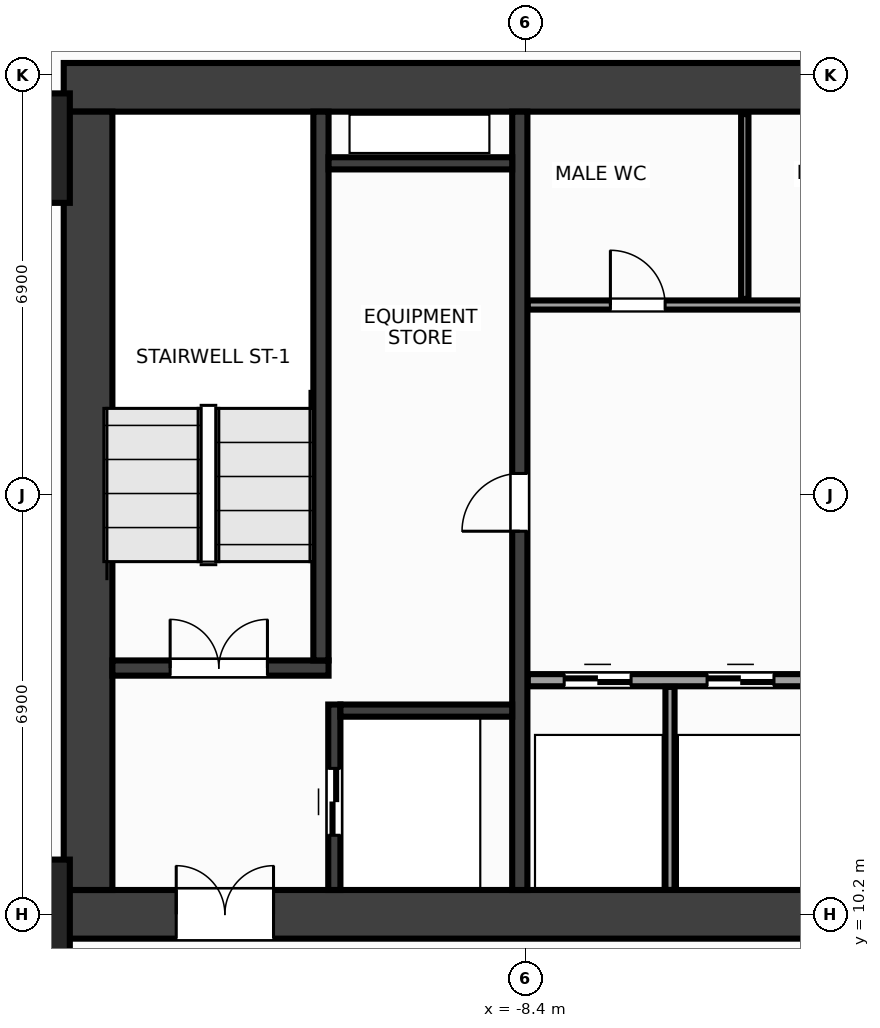
"""IFC4 building model, lengths in metres.
Left out: names, types, materials, properties, quantities, classifications, styles, units other than length and angle.
Written with IfcOpenShell. Run it as: python <this file> out.ifc"""

import sys

from ifc_helpers import new_model, si_unit, direction, frame, frame_2d, origin, origin_2d, place, context, subcontext, project, spatial, rectangle, extrude, source, transform, mapped, element, fill, save


model = new_model("IFC4")
c1 = context("Model", 3, precision=1e-05, world=origin(), true_north=direction((0.0, 1.0)))
c2 = subcontext(c1, "Body", "Model", "MODEL_VIEW")
j1 = project(units=[si_unit("LENGTHUNIT", "METRE"), si_unit("PLANEANGLEUNIT", "RADIAN")], contexts=[c1])
p1 = place(None, origin())
s1 = spatial("IfcSite", under=j1, at=p1, CompositionType="ELEMENT")
p2 = place(p1, origin())
s2 = spatial("IfcBuilding", under=s1, at=p2, CompositionType="ELEMENT")
p3 = place(p2, frame((0.0, 0.0, 30.8)))
s3 = spatial("IfcBuildingStorey", under=s2, at=p3, CompositionType="ELEMENT", Elevation=30.8)
m1 = source(origin(), c2, "Body", "SweptSolid", [
    extrude(rectangle(XDim=32.0, YDim=0.8, at=frame_2d((16.0, 0.0))), origin(), (0.0, 0.0, 1.0), 3.6),
])
p4 = place(p3, frame((-16.0, 23.8, 0.0), z_axis=(0.0, 0.0, 1.0), x_axis=(1.0, 0.0, 0.0)))
e1 = element("IfcWall", 1, at=p4, inside=s3, PredefinedType="SHEAR", context=c2, shape_type="MappedRepresentation", body=[
    mapped(m1, transform((0.0, 0.0, 0.0), x_axis=(1.0, 0.0, 0.0), y_axis=(0.0, 1.0, 0.0), z_axis=(0.0, 0.0, 1.0), scale=1.0)),
])
p5 = place(p3, frame((-16.0, 10.2, 0.0), z_axis=(0.0, 0.0, 1.0), x_axis=(1.0, 0.0, 0.0)))
e2 = element("IfcWall", 2, at=p5, inside=s3, PredefinedType="SHEAR", context=c2, shape_type="MappedRepresentation", body=[
    mapped(m1, transform((0.0, 0.0, 0.0), x_axis=(1.0, 0.0, 0.0), y_axis=(0.0, 1.0, 0.0), z_axis=(0.0, 0.0, 1.0), scale=1.0)),
])
p6 = place(p5, frame((1.85, 0.0, 0.0)))
e3 = element("IfcOpeningElement", 3, at=p6, cuts=e2, PredefinedType="OPENING", context=c2, shape_type="SweptSolid", body=[
    extrude(rectangle(XDim=1.6, YDim=2.15, at=frame_2d((0.8, 1.075))), frame((0.0, 0.412, 0.0), z_axis=(0.0, -1.0, 0.0), x_axis=(1.0, 0.0, 0.0)), (0.0, 0.0, 1.0), 0.824),
])
p7 = place(p5, frame((28.55, 0.0, 0.0)))
e4 = element("IfcOpeningElement", 4, at=p7, cuts=e2, PredefinedType="OPENING", context=c2, shape_type="SweptSolid", body=[
    extrude(rectangle(XDim=1.6, YDim=2.15, at=frame_2d((0.8, 1.075))), frame((0.0, 0.412, 0.0), z_axis=(0.0, -1.0, 0.0), x_axis=(1.0, 0.0, 0.0)), (0.0, 0.0, 1.0), 0.824),
])
p8 = place(p5, frame((15.25, 0.0, 0.0)))
e5 = element("IfcOpeningElement", 5, at=p8, cuts=e2, PredefinedType="OPENING", context=c2, shape_type="SweptSolid", body=[
    extrude(rectangle(XDim=1.5, YDim=2.2, at=frame_2d((0.75, 1.1))), frame((0.0, 0.412, 0.0), z_axis=(0.0, -1.0, 0.0), x_axis=(1.0, 0.0, 0.0)), (0.0, 0.0, 1.0), 0.824),
])
m2 = source(origin(), c2, "Body", "SweptSolid", [
    extrude(rectangle(XDim=12.8, YDim=0.8, at=frame_2d((6.4, 0.0))), origin(), (0.0, 0.0, 1.0), 3.6),
])
p9 = place(p3, frame((-15.6, 10.6, 0.0), z_axis=(0.0, 0.0, 1.0), x_axis=(0.0, 1.0, 0.0)))
e6 = element("IfcWall", 6, at=p9, inside=s3, PredefinedType="SHEAR", context=c2, shape_type="MappedRepresentation", body=[
    mapped(m2, transform((0.0, 0.0, 0.0), x_axis=(1.0, 0.0, 0.0), y_axis=(0.0, 1.0, 0.0), z_axis=(0.0, 0.0, 1.0), scale=1.0)),
])
m3 = source(origin(), c2, "Body", "SweptSolid", [
    extrude(rectangle(XDim=12.8, YDim=0.25, at=frame_2d((6.4, 0.0))), origin(), (0.0, 0.0, 1.0), 3.6),
])
p10 = place(p3, frame((-8.5, 10.6, 0.0), z_axis=(0.0, 0.0, 1.0), x_axis=(0.0, 1.0, 0.0)))
e7 = element("IfcWall", 7, at=p10, inside=s3, PredefinedType="SHEAR", context=c2, shape_type="MappedRepresentation", body=[
    mapped(m3, transform((0.0, 0.0, 0.0), x_axis=(1.0, 0.0, 0.0), y_axis=(0.0, 1.0, 0.0), z_axis=(0.0, 0.0, 1.0), scale=1.0)),
])
p11 = place(p10, frame((5.9, 0.0, 0.0)))
e8 = element("IfcOpeningElement", 8, at=p11, cuts=e7, PredefinedType="OPENING", context=c2, shape_type="SweptSolid", body=[
    extrude(rectangle(XDim=0.95, YDim=2.15, at=frame_2d((0.475, 1.075))), frame((0.0, 0.137, 0.0), z_axis=(0.0, -1.0, 0.0), x_axis=(1.0, 0.0, 0.0)), (0.0, 0.0, 1.0), 0.274),
])
m4 = source(origin(), c2, "Body", "SweptSolid", [
    extrude(rectangle(XDim=3.555, YDim=0.25, at=frame_2d((1.777, 0.0))), origin(), (0.0, 0.0, 1.0), 3.6),
])
p12 = place(p3, frame((-15.2, 14.25, 0.0), z_axis=(0.0, 0.0, 1.0), x_axis=(1.0, 0.0, 0.0)))
e9 = element("IfcWall", 9, at=p12, inside=s3, PredefinedType="SHEAR", context=c2, shape_type="MappedRepresentation", body=[
    mapped(m4, transform((0.0, 0.0, 0.0), x_axis=(1.0, 0.0, 0.0), y_axis=(0.0, 1.0, 0.0), z_axis=(0.0, 0.0, 1.0), scale=1.0)),
])
p13 = place(p12, frame((0.95, 0.0, 0.0)))
e10 = element("IfcOpeningElement", 10, at=p13, cuts=e9, PredefinedType="OPENING", context=c2, shape_type="SweptSolid", body=[
    extrude(rectangle(XDim=1.6, YDim=2.15, at=frame_2d((0.8, 1.075))), frame((0.0, 0.137, 0.0), z_axis=(0.0, -1.0, 0.0), x_axis=(1.0, 0.0, 0.0)), (0.0, 0.0, 1.0), 0.274),
])
m5 = source(origin(), c2, "Body", "SweptSolid", [
    extrude(rectangle(XDim=9.025, YDim=0.25, at=frame_2d((4.512, 0.0))), origin(), (0.0, 0.0, 1.0), 3.6),
])
p14 = place(p3, frame((-11.77, 14.375, 0.0), z_axis=(0.0, 0.0, 1.0), x_axis=(0.0, 1.0, 0.0)))
e11 = element("IfcWall", 11, at=p14, inside=s3, PredefinedType="SHEAR", context=c2, shape_type="MappedRepresentation", body=[
    mapped(m5, transform((0.0, 0.0, 0.0), x_axis=(1.0, 0.0, 0.0), y_axis=(0.0, 1.0, 0.0), z_axis=(0.0, 0.0, 1.0), scale=1.0)),
])
m6 = source(origin(), c2, "Body", "SweptSolid", [
    extrude(rectangle(XDim=3.05, YDim=0.2, at=frame_2d((1.525, 0.0))), origin(), (0.0, 0.0, 1.0), 3.6),
])
p15 = place(p3, frame((-11.55, 10.6, 0.0), z_axis=(0.0, 0.0, 1.0), x_axis=(0.0, 1.0, 0.0)))
e12 = element("IfcWall", 12, at=p15, inside=s3, PredefinedType="SHEAR", context=c2, shape_type="MappedRepresentation", body=[
    mapped(m6, transform((0.0, 0.0, 0.0), x_axis=(1.0, 0.0, 0.0), y_axis=(0.0, 1.0, 0.0), z_axis=(0.0, 0.0, 1.0), scale=1.0)),
])
p16 = place(p15, frame((0.9, 0.0, 0.0)))
e13 = element("IfcOpeningElement", 13, at=p16, cuts=e12, PredefinedType="OPENING", context=c2, shape_type="SweptSolid", body=[
    extrude(rectangle(XDim=1.1, YDim=2.15, at=frame_2d((0.55, 1.075))), frame((0.0, 0.112, 0.0), z_axis=(0.0, -1.0, 0.0), x_axis=(1.0, 0.0, 0.0)), (0.0, 0.0, 1.0), 0.224),
])
m7 = source(origin(), c2, "Body", "SweptSolid", [
    extrude(rectangle(XDim=2.825, YDim=0.2, at=frame_2d((1.413, 0.0))), origin(), (0.0, 0.0, 1.0), 3.6),
])
p17 = place(p3, frame((-11.45, 13.55, 0.0), z_axis=(0.0, 0.0, 1.0), x_axis=(1.0, 0.0, 0.0)))
e14 = element("IfcWall", 14, at=p17, inside=s3, PredefinedType="SHEAR", context=c2, shape_type="MappedRepresentation", body=[
    mapped(m7, transform((0.0, 0.0, 0.0), x_axis=(1.0, 0.0, 0.0), y_axis=(0.0, 1.0, 0.0), z_axis=(0.0, 0.0, 1.0), scale=1.0)),
])
m8 = source(origin(), c2, "Body", "SweptSolid", [
    extrude(rectangle(XDim=3.02, YDim=0.2, at=frame_2d((1.51, 0.0))), origin(), (0.0, 0.0, 1.0), 3.6),
])
p18 = place(p3, frame((-11.645, 22.55, 0.0), z_axis=(0.0, 0.0, 1.0), x_axis=(1.0, 0.0, 0.0)))
e15 = element("IfcWall", 15, at=p18, inside=s3, PredefinedType="SHEAR", context=c2, shape_type="MappedRepresentation", body=[
    mapped(m8, transform((0.0, 0.0, 0.0), x_axis=(1.0, 0.0, 0.0), y_axis=(0.0, 1.0, 0.0), z_axis=(0.0, 0.0, 1.0), scale=1.0)),
])
m9 = source(origin(), c2, "Body", "SweptSolid", [
    extrude(rectangle(XDim=1.8, YDim=1.8, at=origin_2d()), origin(), (0.0, 0.0, 1.0), 3.6),
])
for number, where, z_axis, x_axis in (
    (16, (-16.8, 10.2, 0.0), (0.0, 0.0, 1.0), (1.0, 0.0, 0.0)),
    (17, (-16.8, 22.8, 0.0), (0.0, 0.0, 1.0), (1.0, 0.0, 0.0)),
):
    element("IfcColumn", number, at=place(p3, frame(where, z_axis=z_axis, x_axis=x_axis)), inside=s3, PredefinedType="COLUMN", context=c2, shape_type="MappedRepresentation", body=[
        mapped(m9, transform((0.0, 0.0, 0.0), x_axis=(1.0, 0.0, 0.0), y_axis=(0.0, 1.0, 0.0), z_axis=(0.0, 0.0, 1.0), scale=1.0)),
    ])
m10 = source(origin(), c2, "Body", "SweptSolid", [
    extrude(rectangle(XDim=7.07, YDim=0.2, at=frame_2d((3.535, 0.0))), origin(), (0.0, 0.0, 1.0), 3.36),
])
p19 = place(p3, frame((-8.37, 14.05, 0.0), z_axis=(0.0, 0.0, 1.0), x_axis=(1.0, 0.0, 0.0)))
e18 = element("IfcWall", 18, at=p19, inside=s3, PredefinedType="PARTITIONING", context=c2, shape_type="MappedRepresentation", body=[
    mapped(m10, transform((0.0, 0.0, 0.0), x_axis=(1.0, 0.0, 0.0), y_axis=(0.0, 1.0, 0.0), z_axis=(0.0, 0.0, 1.0), scale=1.0)),
])
p20 = place(p19, frame((0.6, 0.0, 0.0)))
e19 = element("IfcOpeningElement", 19, at=p20, cuts=e18, PredefinedType="OPENING", context=c2, shape_type="SweptSolid", body=[
    extrude(rectangle(XDim=1.1, YDim=2.15, at=frame_2d((0.55, 1.075))), frame((0.0, 0.112, 0.0), z_axis=(0.0, -1.0, 0.0), x_axis=(1.0, 0.0, 0.0)), (0.0, 0.0, 1.0), 0.224),
])
p21 = place(p19, frame((2.95, 0.0, 0.0)))
e20 = element("IfcOpeningElement", 20, at=p21, cuts=e18, PredefinedType="OPENING", context=c2, shape_type="SweptSolid", body=[
    extrude(rectangle(XDim=1.1, YDim=2.15, at=frame_2d((0.55, 1.075))), frame((0.0, 0.112, 0.0), z_axis=(0.0, -1.0, 0.0), x_axis=(1.0, 0.0, 0.0)), (0.0, 0.0, 1.0), 0.224),
])
p22 = place(p19, frame((5.3, 0.0, 0.0)))
e21 = element("IfcOpeningElement", 21, at=p22, cuts=e18, PredefinedType="OPENING", context=c2, shape_type="SweptSolid", body=[
    extrude(rectangle(XDim=1.1, YDim=2.15, at=frame_2d((0.55, 1.075))), frame((0.0, 0.112, 0.0), z_axis=(0.0, -1.0, 0.0), x_axis=(1.0, 0.0, 0.0)), (0.0, 0.0, 1.0), 0.224),
])
m11 = source(origin(), c2, "Body", "SweptSolid", [
    extrude(rectangle(XDim=14.59, YDim=0.15, at=frame_2d((7.295, 0.0))), origin(), (0.0, 0.0, 1.0), 3.36),
])
p23 = place(p3, frame((-8.37, 20.22, 0.0), z_axis=(0.0, 0.0, 1.0), x_axis=(1.0, 0.0, 0.0)))
e22 = element("IfcWall", 22, at=p23, inside=s3, PredefinedType="PARTITIONING", context=c2, shape_type="MappedRepresentation", body=[
    mapped(m11, transform((0.0, 0.0, 0.0), x_axis=(1.0, 0.0, 0.0), y_axis=(0.0, 1.0, 0.0), z_axis=(0.0, 0.0, 1.0), scale=1.0)),
])
p24 = place(p23, frame((1.36, 0.0, 0.0)))
e23 = element("IfcOpeningElement", 23, at=p24, cuts=e22, PredefinedType="OPENING", context=c2, shape_type="SweptSolid", body=[
    extrude(rectangle(XDim=0.9, YDim=2.15, at=frame_2d((0.45, 1.075))), frame((0.0, 0.087, 0.0), z_axis=(0.0, -1.0, 0.0), x_axis=(1.0, 0.0, 0.0)), (0.0, 0.0, 1.0), 0.174),
])
p25 = place(p23, frame((4.92, 0.0, 0.0)))
e24 = element("IfcOpeningElement", 24, at=p25, cuts=e22, PredefinedType="OPENING", context=c2, shape_type="SweptSolid", body=[
    extrude(rectangle(XDim=0.9, YDim=2.15, at=frame_2d((0.45, 1.075))), frame((0.0, 0.087, 0.0), z_axis=(0.0, -1.0, 0.0), x_axis=(1.0, 0.0, 0.0)), (0.0, 0.0, 1.0), 0.174),
])
p26 = place(p23, frame((10.37, 0.0, 0.0)))
e25 = element("IfcOpeningElement", 25, at=p26, cuts=e22, PredefinedType="OPENING", context=c2, shape_type="SweptSolid", body=[
    extrude(rectangle(XDim=0.9, YDim=2.15, at=frame_2d((0.45, 1.075))), frame((0.0, 0.087, 0.0), z_axis=(0.0, -1.0, 0.0), x_axis=(1.0, 0.0, 0.0)), (0.0, 0.0, 1.0), 0.174),
])
m12 = source(origin(), c2, "Body", "SweptSolid", [
    extrude(rectangle(XDim=3.34, YDim=0.15, at=frame_2d((1.67, 0.0))), origin(), (0.0, 0.0, 1.0), 3.36),
])
p27 = place(p3, frame((-6.03, 10.6, 0.0), z_axis=(0.0, 0.0, 1.0), x_axis=(0.0, 1.0, 0.0)))
e26 = element("IfcWall", 26, at=p27, inside=s3, PredefinedType="PARTITIONING", context=c2, shape_type="MappedRepresentation", body=[
    mapped(m12, transform((0.0, 0.0, 0.0), x_axis=(1.0, 0.0, 0.0), y_axis=(0.0, 1.0, 0.0), z_axis=(0.0, 0.0, 1.0), scale=1.0)),
])
m13 = source(origin(), c2, "Body", "SweptSolid", [
    extrude(rectangle(XDim=3.04, YDim=0.12, at=frame_2d((1.52, 0.0))), origin(), (0.0, 0.0, 1.0), 3.36),
])
p28 = place(p3, frame((-4.8, 20.32, 0.0), z_axis=(0.0, 0.0, 1.0), x_axis=(0.0, 1.0, 0.0)))
e27 = element("IfcWall", 27, at=p28, inside=s3, PredefinedType="PARTITIONING", context=c2, shape_type="MappedRepresentation", body=[
    mapped(m13, transform((0.0, 0.0, 0.0), x_axis=(1.0, 0.0, 0.0), y_axis=(0.0, 1.0, 0.0), z_axis=(0.0, 0.0, 1.0), scale=1.0)),
])
m14 = source(origin(), c2, "Body", "SweptSolid", [
    extrude(rectangle(XDim=1.6, YDim=2.15, at=frame_2d((0.8, 1.075))), frame((0.0, 0.025, 0.0), z_axis=(0.0, -1.0, 0.0), x_axis=(1.0, 0.0, 0.0)), (0.0, 0.0, 1.0), 0.05),
])
p29 = place(p13, origin())
e28 = element("IfcDoor", 28, at=p29, inside=s3, OperationType="DOUBLE_DOOR_SINGLE_SWING", PredefinedType="DOOR", context=c2, shape_type="MappedRepresentation", body=[
    mapped(m14, transform((0.0, 0.0, 0.0), x_axis=(1.0, 0.0, 0.0), y_axis=(0.0, 1.0, 0.0), z_axis=(0.0, 0.0, 1.0), scale=1.0)),
])
fill(e10, e28)
p30 = place(p6, origin())
e29 = element("IfcDoor", 29, at=p30, inside=s3, OperationType="DOUBLE_DOOR_SINGLE_SWING", PredefinedType="DOOR", context=c2, shape_type="MappedRepresentation", body=[
    mapped(m14, transform((0.0, 0.0, 0.0), x_axis=(1.0, 0.0, 0.0), y_axis=(0.0, 1.0, 0.0), z_axis=(0.0, 0.0, 1.0), scale=1.0)),
])
fill(e3, e29)
m15 = source(origin(), c2, "Body", "SweptSolid", [
    extrude(rectangle(XDim=1.1, YDim=2.15, at=frame_2d((0.55, 1.075))), frame((0.0, 0.025, 0.0), z_axis=(0.0, -1.0, 0.0), x_axis=(1.0, 0.0, 0.0)), (0.0, 0.0, 1.0), 0.05),
])
p31 = place(p16, origin())
e30 = element("IfcDoor", 30, at=p31, inside=s3, OperationType="DOUBLE_DOOR_SLIDING", PredefinedType="DOOR", context=c2, shape_type="MappedRepresentation", body=[
    mapped(m15, transform((0.0, 0.0, 0.0), x_axis=(1.0, 0.0, 0.0), y_axis=(0.0, 1.0, 0.0), z_axis=(0.0, 0.0, 1.0), scale=1.0)),
])
fill(e13, e30)
m16 = source(origin(), c2, "Body", "SweptSolid", [
    extrude(rectangle(XDim=0.95, YDim=2.15, at=frame_2d((0.475, 1.075))), frame((0.0, 0.025, 0.0), z_axis=(0.0, -1.0, 0.0), x_axis=(1.0, 0.0, 0.0)), (0.0, 0.0, 1.0), 0.05),
])
p32 = place(p11, origin())
e31 = element("IfcDoor", 31, at=p32, inside=s3, OperationType="SINGLE_SWING_LEFT", PredefinedType="DOOR", context=c2, shape_type="MappedRepresentation", body=[
    mapped(m16, transform((0.0, 0.0, 0.0), x_axis=(1.0, 0.0, 0.0), y_axis=(0.0, 1.0, 0.0), z_axis=(0.0, 0.0, 1.0), scale=1.0)),
])
fill(e8, e31)
p33 = place(p20, origin())
e32 = element("IfcDoor", 32, at=p33, inside=s3, OperationType="DOUBLE_DOOR_SLIDING", PredefinedType="DOOR", context=c2, shape_type="MappedRepresentation", body=[
    mapped(m15, transform((0.0, 0.0, 0.0), x_axis=(1.0, 0.0, 0.0), y_axis=(0.0, 1.0, 0.0), z_axis=(0.0, 0.0, 1.0), scale=1.0)),
])
fill(e19, e32)
p34 = place(p21, origin())
e33 = element("IfcDoor", 33, at=p34, inside=s3, OperationType="DOUBLE_DOOR_SLIDING", PredefinedType="DOOR", context=c2, shape_type="MappedRepresentation", body=[
    mapped(m15, transform((0.0, 0.0, 0.0), x_axis=(1.0, 0.0, 0.0), y_axis=(0.0, 1.0, 0.0), z_axis=(0.0, 0.0, 1.0), scale=1.0)),
])
fill(e20, e33)
m17 = source(origin(), c2, "Body", "SweptSolid", [
    extrude(rectangle(XDim=0.9, YDim=2.15, at=frame_2d((0.45, 1.075))), frame((0.0, 0.025, 0.0), z_axis=(0.0, -1.0, 0.0), x_axis=(1.0, 0.0, 0.0)), (0.0, 0.0, 1.0), 0.05),
])
p35 = place(p24, origin())
e34 = element("IfcDoor", 34, at=p35, inside=s3, OperationType="SINGLE_SWING_LEFT", PredefinedType="DOOR", context=c2, shape_type="MappedRepresentation", body=[
    mapped(m17, transform((0.0, 0.0, 0.0), x_axis=(1.0, 0.0, 0.0), y_axis=(0.0, 1.0, 0.0), z_axis=(0.0, 0.0, 1.0), scale=1.0)),
])
fill(e23, e34)
save(model, sys.argv[1])
